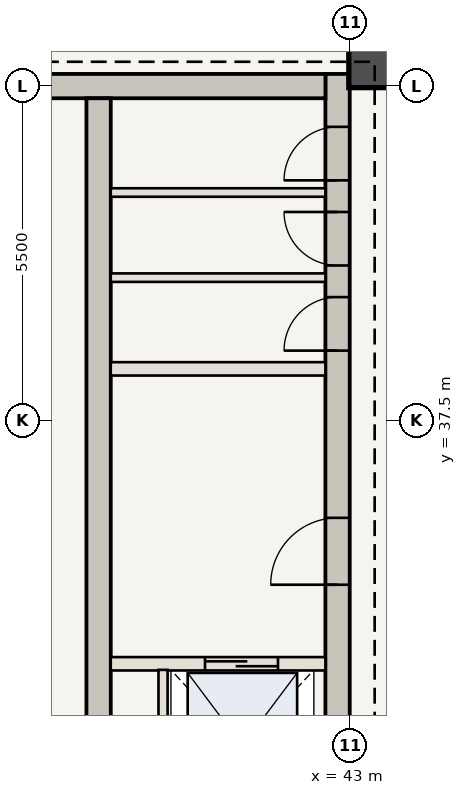
"""IFC4 building model, lengths in metres.
Left out: names, types, materials, properties, quantities, classifications, styles, units other than length and angle.
Written with IfcOpenShell. Run it as: python <this file> out.ifc"""

import sys

from ifc_helpers import new_model, si_unit, direction, frame, frame_2d, origin, origin_2d, place, context, subcontext, project, spatial, rectangle, extrude, element, fill, save


model = new_model("IFC4")
c1 = context("Model", 3, precision=1e-05, world=origin(), true_north=direction((0.0, 1.0)))
c2 = subcontext(c1, "Body", "Model", "MODEL_VIEW")
j1 = project(units=[si_unit("LENGTHUNIT", "METRE"), si_unit("PLANEANGLEUNIT", "RADIAN")], contexts=[c1])
p1 = place(None, origin())
s1 = spatial("IfcSite", under=j1, at=p1, CompositionType="ELEMENT")
p2 = place(p1, origin())
s2 = spatial("IfcBuilding", under=s1, at=p2, CompositionType="ELEMENT")
p3 = place(p2, frame((0.0, 0.0, 281.4)))
s3 = spatial("IfcBuildingStorey", under=s2, at=p3, CompositionType="ELEMENT", Elevation=281.4)
p4 = place(p3, frame((42.79, 30.6, 0.0), z_axis=(0.0, 0.0, 1.0), x_axis=(0.0, 1.0, 0.0)))
e1 = element("IfcWall", 1, at=p4, inside=s3, PredefinedType="SHEAR", context=c2, shape_type="SweptSolid", body=[
    extrude(rectangle(XDim=12.6, YDim=0.4, at=frame_2d((6.3, 0.0))), origin(), (0.0, 0.0, 1.0), 3.85),
])
p5 = place(p4, frame((4.2, 0.0, 0.0)))
e2 = element("IfcOpeningElement", 2, at=p5, cuts=e1, PredefinedType="OPENING", context=c2, shape_type="SweptSolid", body=[
    extrude(rectangle(XDim=1.1, YDim=2.15, at=frame_2d((0.55, 1.075))), frame((0.0, 0.21, 0.0), z_axis=(0.0, -1.0, 0.0), x_axis=(1.0, 0.0, 0.0)), (0.0, 0.0, 1.0), 0.42),
])
p6 = place(p4, frame((8.05, 0.0, 0.0)))
e3 = element("IfcOpeningElement", 3, at=p6, cuts=e1, PredefinedType="OPENING", context=c2, shape_type="SweptSolid", body=[
    extrude(rectangle(XDim=0.88, YDim=2.1, at=frame_2d((0.44, 1.05))), frame((0.0, 0.21, 0.0), z_axis=(0.0, -1.0, 0.0), x_axis=(1.0, 0.0, 0.0)), (0.0, 0.0, 1.0), 0.42),
])
p7 = place(p4, frame((9.45, 0.0, 0.0)))
e4 = element("IfcOpeningElement", 4, at=p7, cuts=e1, PredefinedType="OPENING", context=c2, shape_type="SweptSolid", body=[
    extrude(rectangle(XDim=0.88, YDim=2.1, at=frame_2d((0.44, 1.05))), frame((0.0, 0.21, 0.0), z_axis=(0.0, -1.0, 0.0), x_axis=(1.0, 0.0, 0.0)), (0.0, 0.0, 1.0), 0.42),
])
p8 = place(p4, frame((10.85, 0.0, 0.0)))
e5 = element("IfcOpeningElement", 5, at=p8, cuts=e1, PredefinedType="OPENING", context=c2, shape_type="SweptSolid", body=[
    extrude(rectangle(XDim=0.88, YDim=2.1, at=frame_2d((0.44, 1.05))), frame((0.0, 0.21, 0.0), z_axis=(0.0, -1.0, 0.0), x_axis=(1.0, 0.0, 0.0)), (0.0, 0.0, 1.0), 0.42),
])
p9 = place(p3, frame((37.75, 43.0, 0.0), z_axis=(0.0, 0.0, 1.0), x_axis=(1.0, 0.0, 0.0)))
e6 = element("IfcWall", 6, at=p9, inside=s3, PredefinedType="SHEAR", context=c2, shape_type="SweptSolid", body=[
    extrude(rectangle(XDim=4.84, YDim=0.4, at=frame_2d((2.42, 0.0))), origin(), (0.0, 0.0, 1.0), 3.85),
])
p10 = place(p3, frame((38.86, 30.6, 0.0), z_axis=(0.0, 0.0, 1.0), x_axis=(0.0, 1.0, 0.0)))
e7 = element("IfcWall", 7, at=p10, inside=s3, PredefinedType="SHEAR", context=c2, shape_type="SweptSolid", body=[
    extrude(rectangle(XDim=12.2, YDim=0.4, at=frame_2d((6.1, 0.0))), origin(), (0.0, 0.0, 1.0), 3.85),
])
p11 = place(p3, frame((43.35, 43.35, 0.0), z_axis=(0.0, 0.0, 1.0), x_axis=(1.0, 0.0, 0.0)))
e8 = element("IfcColumn", 8, at=p11, inside=s3, PredefinedType="COLUMN", context=c2, shape_type="SweptSolid", body=[
    extrude(rectangle(XDim=0.75, YDim=0.75, at=origin_2d()), origin(), (0.0, 0.0, 1.0), 3.85),
])
p12 = place(p3, frame((39.06, 33.5, 0.0), z_axis=(0.0, 0.0, 1.0), x_axis=(1.0, 0.0, 0.0)))
e9 = element("IfcWall", 9, at=p12, inside=s3, PredefinedType="STANDARD", context=c2, shape_type="SweptSolid", body=[
    extrude(rectangle(XDim=3.53, YDim=0.22, at=frame_2d((1.765, 0.0))), origin(), (0.0, 0.0, 1.0), 3.685),
])
p13 = place(p12, frame((1.55, 0.0, 0.0)))
e10 = element("IfcOpeningElement", 10, at=p13, cuts=e9, PredefinedType="OPENING", context=c2, shape_type="SweptSolid", body=[
    extrude(rectangle(XDim=1.2, YDim=2.2, at=frame_2d((0.6, 1.1))), frame((0.0, 0.12, 0.0), z_axis=(0.0, -1.0, 0.0), x_axis=(1.0, 0.0, 0.0)), (0.0, 0.0, 1.0), 0.24),
])
p14 = place(p3, frame((39.92, 30.75, 0.0), z_axis=(0.0, 0.0, 1.0), x_axis=(0.0, 1.0, 0.0)))
e11 = element("IfcWall", 11, at=p14, inside=s3, PredefinedType="STANDARD", context=c2, shape_type="SweptSolid", body=[
    extrude(rectangle(XDim=2.65, YDim=0.15, at=frame_2d((1.325, 0.0))), origin(), (0.0, 0.0, 1.0), 3.685),
])
p15 = place(p3, frame((39.06, 38.35, 0.0), z_axis=(0.0, 0.0, 1.0), x_axis=(1.0, 0.0, 0.0)))
e12 = element("IfcWall", 12, at=p15, inside=s3, PredefinedType="STANDARD", context=c2, shape_type="SweptSolid", body=[
    extrude(rectangle(XDim=3.53, YDim=0.22, at=frame_2d((1.765, 0.0))), origin(), (0.0, 0.0, 1.0), 3.685),
])
for number, where, z_axis, x_axis in (
    (13, (39.06, 39.85, 0.0), (0.0, 0.0, 1.0), (1.0, 0.0, 0.0)),
    (14, (39.06, 41.25, 0.0), (0.0, 0.0, 1.0), (1.0, 0.0, 0.0)),
):
    element("IfcWall", number, at=place(p3, frame(where, z_axis=z_axis, x_axis=x_axis)), inside=s3, PredefinedType="STANDARD", context=c2, shape_type="SweptSolid", body=[
        extrude(rectangle(XDim=3.53, YDim=0.14, at=frame_2d((1.765, 0.0))), origin(), (0.0, 0.0, 1.0), 3.685),
    ])
p16 = place(p5, origin())
e15 = element("IfcDoor", 15, at=p16, inside=s3, OperationType="SINGLE_SWING_LEFT", PredefinedType="DOOR", context=c2, shape_type="SweptSolid", body=[
    extrude(rectangle(XDim=1.1, YDim=2.15, at=frame_2d((0.55, 1.075))), frame((0.0, 0.025, 0.0), z_axis=(0.0, -1.0, 0.0), x_axis=(1.0, 0.0, 0.0)), (0.0, 0.0, 1.0), 0.05),
])
fill(e2, e15)
p17 = place(p6, origin())
e16 = element("IfcDoor", 16, at=p17, inside=s3, OperationType="SINGLE_SWING_LEFT", PredefinedType="DOOR", context=c2, shape_type="SweptSolid", body=[
    extrude(rectangle(XDim=0.88, YDim=2.1, at=frame_2d((0.44, 1.05))), frame((0.0, 0.025, 0.0), z_axis=(0.0, -1.0, 0.0), x_axis=(1.0, 0.0, 0.0)), (0.0, 0.0, 1.0), 0.05),
])
fill(e3, e16)
p18 = place(p7, origin())
e17 = element("IfcDoor", 17, at=p18, inside=s3, OperationType="SINGLE_SWING_RIGHT", PredefinedType="DOOR", context=c2, shape_type="SweptSolid", body=[
    extrude(rectangle(XDim=0.88, YDim=2.1, at=frame_2d((0.44, 1.05))), frame((0.0, 0.025, 0.0), z_axis=(0.0, -1.0, 0.0), x_axis=(1.0, 0.0, 0.0)), (0.0, 0.0, 1.0), 0.05),
])
fill(e4, e17)
p19 = place(p8, origin())
e18 = element("IfcDoor", 18, at=p19, inside=s3, OperationType="SINGLE_SWING_LEFT", PredefinedType="DOOR", context=c2, shape_type="SweptSolid", body=[
    extrude(rectangle(XDim=0.88, YDim=2.1, at=frame_2d((0.44, 1.05))), frame((0.0, 0.025, 0.0), z_axis=(0.0, -1.0, 0.0), x_axis=(1.0, 0.0, 0.0)), (0.0, 0.0, 1.0), 0.05),
])
fill(e5, e18)
p20 = place(p13, origin())
e19 = element("IfcDoor", 19, at=p20, inside=s3, OperationType="DOUBLE_DOOR_SLIDING", PredefinedType="DOOR", context=c2, shape_type="SweptSolid", body=[
    extrude(rectangle(XDim=1.2, YDim=2.2, at=frame_2d((0.6, 1.1))), frame((0.0, 0.025, 0.0), z_axis=(0.0, -1.0, 0.0), x_axis=(1.0, 0.0, 0.0)), (0.0, 0.0, 1.0), 0.05),
])
fill(e10, e19)
save(model, sys.argv[1])
